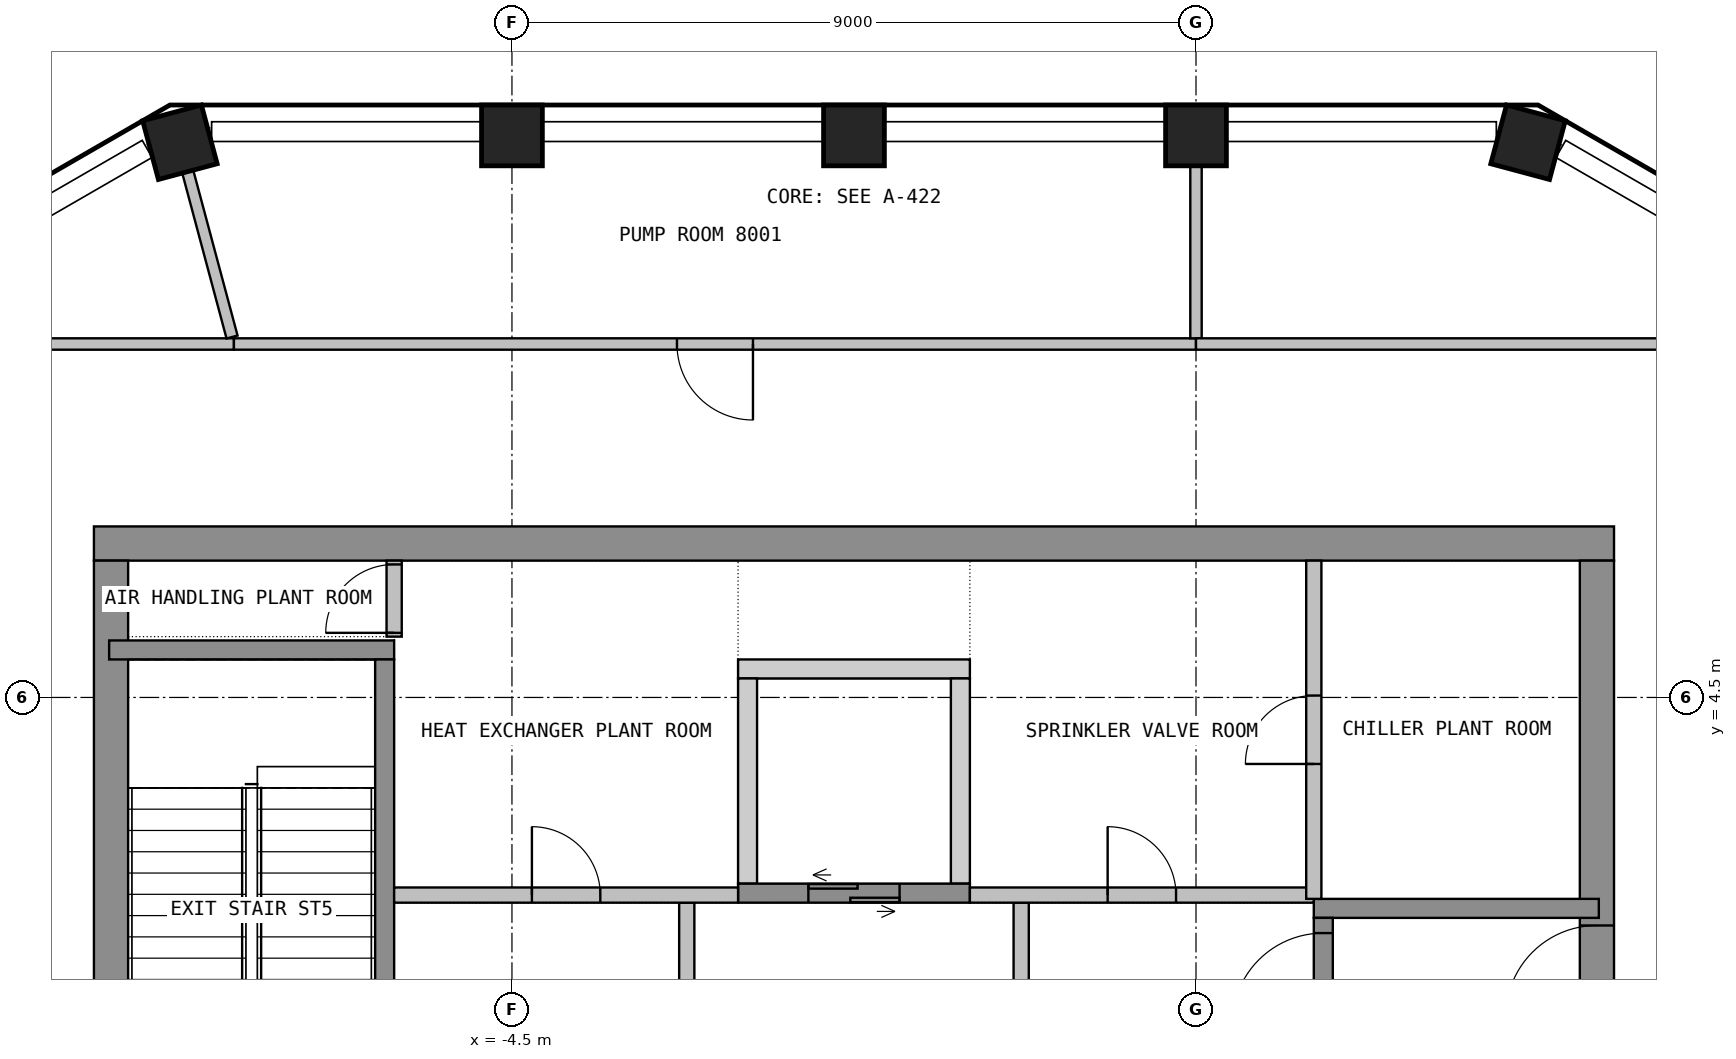
"""IFC4 building model, lengths in metres.
Left out: names, types, materials, properties, quantities, classifications, styles, units other than length and angle.
Written with IfcOpenShell. Run it as: python <this file> out.ifc"""

import sys

from ifc_helpers import new_model, si_unit, direction, frame, frame_2d, origin, origin_2d, place, context, subcontext, project, spatial, polyline, rectangle, outline, extrude, element, fill, save


model = new_model("IFC4")
c1 = context("Model", 3, precision=1e-05, world=origin(), true_north=direction((0.0, 1.0)))
c2 = subcontext(c1, "Body", "Model", "MODEL_VIEW")
j1 = project(units=[si_unit("LENGTHUNIT", "METRE"), si_unit("PLANEANGLEUNIT", "RADIAN")], contexts=[c1])
p1 = place(None, origin())
s1 = spatial("IfcSite", under=j1, at=p1, CompositionType="ELEMENT")
p2 = place(p1, origin())
s2 = spatial("IfcBuilding", under=s1, at=p2, CompositionType="ELEMENT")
p3 = place(p2, frame((0.0, 0.0, 327.9)))
s3 = spatial("IfcBuildingStorey", under=s2, at=p3, CompositionType="ELEMENT", Elevation=327.9)
for number, where, z_axis, x_axis in (
    (1, (8.869, 11.804, 0.0), (0.0, 0.0, 1.0), (-0.966, 0.259, 0.0)),
    (2, (4.5, 11.894, 0.0), (0.0, 0.0, 1.0), (-1.0, 0.0, 0.0)),
    (3, (0.0, 11.894, 0.0), (0.0, 0.0, 1.0), (-1.0, 0.0, 0.0)),
    (4, (-4.5, 11.894, 0.0), (0.0, 0.0, 1.0), (-1.0, 0.0, 0.0)),
    (5, (-8.869, 11.804, 0.0), (0.0, 0.0, 1.0), (-0.966, -0.259, 0.0)),
):
    element("IfcColumn", number, at=place(p3, frame(where, z_axis=z_axis, x_axis=x_axis)), inside=s3, PredefinedType="COLUMN", context=c2, shape_type="SweptSolid", body=[
        extrude(rectangle(XDim=0.8, YDim=0.8, at=origin_2d()), origin(), (0.0, 0.0, 1.0), 3.6),
    ])
p4 = place(p3, frame((-10.0, 6.525, 0.0), z_axis=(0.0, 0.0, 1.0), x_axis=(1.0, 0.0, 0.0)))
e6 = element("IfcWall", 6, at=p4, inside=s3, PredefinedType="SHEAR", context=c2, shape_type="SweptSolid", body=[
    extrude(rectangle(XDim=20.0, YDim=0.45, at=frame_2d((10.0, 0.0))), origin(), (0.0, 0.0, 1.0), 3.6),
])
p5 = place(p3, frame((-9.775, -6.3, 0.0), z_axis=(0.0, 0.0, 1.0), x_axis=(0.0, 1.0, 0.0)))
e7 = element("IfcWall", 7, at=p5, inside=s3, PredefinedType="SHEAR", context=c2, shape_type="SweptSolid", body=[
    extrude(rectangle(XDim=12.6, YDim=0.45, at=frame_2d((6.3, 0.0))), origin(), (0.0, 0.0, 1.0), 3.6),
])
p6 = place(p5, frame((4.8, 0.0, 0.0)))
e8 = element("IfcOpeningElement", 8, at=p6, cuts=e7, PredefinedType="OPENING", context=c2, shape_type="SweptSolid", body=[
    extrude(rectangle(XDim=1.2, YDim=2.1, at=frame_2d((0.6, 1.05))), frame((0.0, 0.235, 0.0), z_axis=(0.0, -1.0, 0.0), x_axis=(1.0, 0.0, 0.0)), (0.0, 0.0, 1.0), 0.47),
])
p7 = place(p3, frame((9.775, -6.3, 0.0), z_axis=(0.0, 0.0, 1.0), x_axis=(0.0, 1.0, 0.0)))
e9 = element("IfcWall", 9, at=p7, inside=s3, PredefinedType="SHEAR", context=c2, shape_type="SweptSolid", body=[
    extrude(rectangle(XDim=12.6, YDim=0.45, at=frame_2d((6.3, 0.0))), origin(), (0.0, 0.0, 1.0), 3.6),
])
p8 = place(p7, frame((6.6, 0.0, 0.0)))
e10 = element("IfcOpeningElement", 10, at=p8, cuts=e9, PredefinedType="OPENING", context=c2, shape_type="SweptSolid", body=[
    extrude(rectangle(XDim=1.2, YDim=2.1, at=frame_2d((0.6, 1.05))), frame((0.0, 0.235, 0.0), z_axis=(0.0, -1.0, 0.0), x_axis=(1.0, 0.0, 0.0)), (0.0, 0.0, 1.0), 0.47),
])
p9 = place(p3, origin())
e11 = element("IfcWall", 11, at=p9, inside=s3, PredefinedType="SHEAR", context=c2, shape_type="SweptSolid", body=[
    extrude(outline(polyline([(-1.525, 4.75), (1.525, 4.75), (1.525, 5.0), (-1.525, 5.0), (-1.525, 4.75)])), origin(), (0.0, 0.0, 1.0), 3.6),
])
p10 = place(p3, origin())
e12 = element("IfcWall", 12, at=p10, inside=s3, PredefinedType="SHEAR", context=c2, shape_type="SweptSolid", body=[
    extrude(outline(polyline([(-1.525, 2.05), (-1.275, 2.05), (-1.275, 4.75), (-1.525, 4.75), (-1.525, 2.05)])), origin(), (0.0, 0.0, 1.0), 3.6),
])
p11 = place(p3, origin())
e13 = element("IfcWall", 13, at=p11, inside=s3, PredefinedType="SHEAR", context=c2, shape_type="SweptSolid", body=[
    extrude(outline(polyline([(1.275, 2.05), (1.525, 2.05), (1.525, 4.75), (1.275, 4.75), (1.275, 2.05)])), origin(), (0.0, 0.0, 1.0), 3.6),
])
p12 = place(p3, frame((-1.525, 1.925, 0.0), z_axis=(0.0, 0.0, 1.0), x_axis=(1.0, 0.0, 0.0)))
e14 = element("IfcWall", 14, at=p12, inside=s3, PredefinedType="SHEAR", context=c2, shape_type="SweptSolid", body=[
    extrude(rectangle(XDim=3.05, YDim=0.25, at=frame_2d((1.525, 0.0))), origin(), (0.0, 0.0, 1.0), 3.6),
])
p13 = place(p12, frame((0.925, 0.0, 0.0)))
e15 = element("IfcOpeningElement", 15, at=p13, cuts=e14, PredefinedType="OPENING", context=c2, shape_type="SweptSolid", body=[
    extrude(rectangle(XDim=1.2, YDim=2.1, at=frame_2d((0.6, 1.05))), frame((0.0, 0.135, 0.0), z_axis=(0.0, -1.0, 0.0), x_axis=(1.0, 0.0, 0.0)), (0.0, 0.0, 1.0), 0.27),
])
p14 = place(p3, frame((-2.2, -1.8, 0.0), z_axis=(0.0, 0.0, 1.0), x_axis=(0.0, 1.0, 0.0)))
e16 = element("IfcWall", 16, at=p14, inside=s3, PredefinedType="PARTITIONING", context=c2, shape_type="SweptSolid", body=[
    extrude(rectangle(XDim=3.6, YDim=0.2, at=frame_2d((1.8, 0.0))), origin(), (0.0, 0.0, 1.0), 3.6),
])
p15 = place(p14, frame((1.2, 0.0, 0.0)))
e17 = element("IfcOpeningElement", 17, at=p15, cuts=e16, PredefinedType="OPENING", context=c2, shape_type="SweptSolid", body=[
    extrude(rectangle(XDim=1.2, YDim=2.1, at=frame_2d((0.6, 1.05))), frame((0.0, 0.11, 0.0), z_axis=(0.0, -1.0, 0.0), x_axis=(1.0, 0.0, 0.0)), (0.0, 0.0, 1.0), 0.22),
])
p16 = place(p3, frame((2.2, -1.8, 0.0), z_axis=(0.0, 0.0, 1.0), x_axis=(0.0, 1.0, 0.0)))
e18 = element("IfcWall", 18, at=p16, inside=s3, PredefinedType="PARTITIONING", context=c2, shape_type="SweptSolid", body=[
    extrude(rectangle(XDim=3.6, YDim=0.2, at=frame_2d((1.8, 0.0))), origin(), (0.0, 0.0, 1.0), 3.6),
])
p17 = place(p16, frame((1.2, 0.0, 0.0)))
e19 = element("IfcOpeningElement", 19, at=p17, cuts=e18, PredefinedType="OPENING", context=c2, shape_type="SweptSolid", body=[
    extrude(rectangle(XDim=1.2, YDim=2.1, at=frame_2d((0.6, 1.05))), frame((0.0, 0.11, 0.0), z_axis=(0.0, -1.0, 0.0), x_axis=(1.0, 0.0, 0.0)), (0.0, 0.0, 1.0), 0.22),
])
p18 = place(p3, frame((-9.8, 5.125, 0.0), z_axis=(0.0, 0.0, 1.0), x_axis=(1.0, 0.0, 0.0)))
e20 = element("IfcWall", 20, at=p18, inside=s3, PredefinedType="SHEAR", context=c2, shape_type="SweptSolid", body=[
    extrude(rectangle(XDim=3.75, YDim=0.25, at=frame_2d((1.875, 0.0))), origin(), (0.0, 0.0, 1.0), 3.6),
])
p19 = place(p3, frame((-6.175, -1.6, 0.0), z_axis=(0.0, 0.0, 1.0), x_axis=(0.0, 1.0, 0.0)))
e21 = element("IfcWall", 21, at=p19, inside=s3, PredefinedType="SHEAR", context=c2, shape_type="SweptSolid", body=[
    extrude(rectangle(XDim=6.6, YDim=0.25, at=frame_2d((3.3, 0.0))), origin(), (0.0, 0.0, 1.0), 3.6),
])
p20 = place(p19, frame((0.2, 0.0, 0.0)))
e22 = element("IfcOpeningElement", 22, at=p20, cuts=e21, PredefinedType="OPENING", context=c2, shape_type="SweptSolid", body=[
    extrude(rectangle(XDim=1.2, YDim=2.1, at=frame_2d((0.6, 1.05))), frame((0.0, 0.135, 0.0), z_axis=(0.0, -1.0, 0.0), x_axis=(1.0, 0.0, 0.0)), (0.0, 0.0, 1.0), 0.27),
])
p21 = place(p3, frame((6.05, 1.725, 0.0), z_axis=(0.0, 0.0, 1.0), x_axis=(1.0, 0.0, 0.0)))
e23 = element("IfcWall", 23, at=p21, inside=s3, PredefinedType="SHEAR", context=c2, shape_type="SweptSolid", body=[
    extrude(rectangle(XDim=3.75, YDim=0.25, at=frame_2d((1.875, 0.0))), origin(), (0.0, 0.0, 1.0), 3.6),
])
p22 = place(p3, frame((6.175, -5.0, 0.0), z_axis=(0.0, 0.0, 1.0), x_axis=(0.0, 1.0, 0.0)))
e24 = element("IfcWall", 24, at=p22, inside=s3, PredefinedType="SHEAR", context=c2, shape_type="SweptSolid", body=[
    extrude(rectangle(XDim=6.6, YDim=0.25, at=frame_2d((3.3, 0.0))), origin(), (0.0, 0.0, 1.0), 3.6),
])
p23 = place(p22, frame((5.2, 0.0, 0.0)))
e25 = element("IfcOpeningElement", 25, at=p23, cuts=e24, PredefinedType="OPENING", context=c2, shape_type="SweptSolid", body=[
    extrude(rectangle(XDim=1.2, YDim=2.1, at=frame_2d((0.6, 1.05))), frame((0.0, 0.135, 0.0), z_axis=(0.0, -1.0, 0.0), x_axis=(1.0, 0.0, 0.0)), (0.0, 0.0, 1.0), 0.27),
])
p24 = place(p3, frame((-6.05, 1.9, 0.0), z_axis=(0.0, 0.0, 1.0), x_axis=(1.0, 0.0, 0.0)))
e26 = element("IfcWall", 26, at=p24, inside=s3, PredefinedType="PARTITIONING", context=c2, shape_type="SweptSolid", body=[
    extrude(rectangle(XDim=4.525, YDim=0.2, at=frame_2d((2.263, 0.0))), origin(), (0.0, 0.0, 1.0), 3.6),
])
p25 = place(p24, frame((1.812, 0.0, 0.0)))
e27 = element("IfcOpeningElement", 27, at=p25, cuts=e26, PredefinedType="OPENING", context=c2, shape_type="SweptSolid", body=[
    extrude(rectangle(XDim=0.9, YDim=2.1, at=frame_2d((0.45, 1.05))), frame((0.0, 0.11, 0.0), z_axis=(0.0, -1.0, 0.0), x_axis=(1.0, 0.0, 0.0)), (0.0, 0.0, 1.0), 0.22),
])
p26 = place(p3, frame((1.525, 1.9, 0.0), z_axis=(0.0, 0.0, 1.0), x_axis=(1.0, 0.0, 0.0)))
e28 = element("IfcWall", 28, at=p26, inside=s3, PredefinedType="PARTITIONING", context=c2, shape_type="SweptSolid", body=[
    extrude(rectangle(XDim=4.525, YDim=0.2, at=frame_2d((2.263, 0.0))), origin(), (0.0, 0.0, 1.0), 3.6),
])
p27 = place(p26, frame((1.812, 0.0, 0.0)))
e29 = element("IfcOpeningElement", 29, at=p27, cuts=e28, PredefinedType="OPENING", context=c2, shape_type="SweptSolid", body=[
    extrude(rectangle(XDim=0.9, YDim=2.1, at=frame_2d((0.45, 1.05))), frame((0.0, 0.11, 0.0), z_axis=(0.0, -1.0, 0.0), x_axis=(1.0, 0.0, 0.0)), (0.0, 0.0, 1.0), 0.22),
])
p28 = place(p3, frame((-6.05, 5.3, 0.0), z_axis=(0.0, 0.0, 1.0), x_axis=(0.0, 1.0, 0.0)))
e30 = element("IfcWall", 30, at=p28, inside=s3, PredefinedType="PARTITIONING", context=c2, shape_type="SweptSolid", body=[
    extrude(rectangle(XDim=1.0, YDim=0.2, at=frame_2d((0.5, 0.0))), origin(), (0.0, 0.0, 1.0), 3.6),
])
p29 = place(p28, frame((0.05, 0.0, 0.0)))
e31 = element("IfcOpeningElement", 31, at=p29, cuts=e30, PredefinedType="OPENING", context=c2, shape_type="SweptSolid", body=[
    extrude(rectangle(XDim=0.9, YDim=2.1, at=frame_2d((0.45, 1.05))), frame((0.0, 0.11, 0.0), z_axis=(0.0, -1.0, 0.0), x_axis=(1.0, 0.0, 0.0)), (0.0, 0.0, 1.0), 0.22),
])
p30 = place(p3, frame((6.05, 1.85, 0.0), z_axis=(0.0, 0.0, 1.0), x_axis=(0.0, 1.0, 0.0)))
e32 = element("IfcWall", 32, at=p30, inside=s3, PredefinedType="PARTITIONING", context=c2, shape_type="SweptSolid", body=[
    extrude(rectangle(XDim=4.45, YDim=0.2, at=frame_2d((2.225, 0.0))), origin(), (0.0, 0.0, 1.0), 3.6),
])
p31 = place(p30, frame((1.775, 0.0, 0.0)))
e33 = element("IfcOpeningElement", 33, at=p31, cuts=e32, PredefinedType="OPENING", context=c2, shape_type="SweptSolid", body=[
    extrude(rectangle(XDim=0.9, YDim=2.1, at=frame_2d((0.45, 1.05))), frame((0.0, 0.11, 0.0), z_axis=(0.0, -1.0, 0.0), x_axis=(1.0, 0.0, 0.0)), (0.0, 0.0, 1.0), 0.22),
])
p32 = place(p3, frame((-8.158, 9.15, 0.0), z_axis=(0.0, 0.0, 1.0), x_axis=(-1.0, 0.0, 0.0)))
e34 = element("IfcWall", 34, at=p32, inside=s3, PredefinedType="PARTITIONING", context=c2, shape_type="SweptSolid", body=[
    extrude(rectangle(XDim=4.167, YDim=0.15, at=frame_2d((2.083, 0.0))), origin(), (0.0, 0.0, 1.0), 3.6),
])
p33 = place(p3, frame((-8.92, 11.994, 0.0), z_axis=(0.0, 0.0, 1.0), x_axis=(0.258771776933, -0.965938490517, 0.0)))
e35 = element("IfcWall", 35, at=p33, inside=s3, PredefinedType="PARTITIONING", context=c2, shape_type="SweptSolid", body=[
    extrude(rectangle(XDim=2.849, YDim=0.15, at=frame_2d((1.425, 0.0))), origin(), (0.0, 0.0, 1.0), 3.6),
])
p34 = place(p3, frame((4.5, 9.15, 0.0), z_axis=(0.0, 0.0, 1.0), x_axis=(-1.0, 0.0, 0.0)))
e36 = element("IfcWall", 36, at=p34, inside=s3, PredefinedType="PARTITIONING", context=c2, shape_type="SweptSolid", body=[
    extrude(rectangle(XDim=12.658, YDim=0.15, at=frame_2d((6.329, 0.0))), origin(), (0.0, 0.0, 1.0), 3.6),
])
p35 = place(p34, frame((5.829, 0.0, 0.0)))
e37 = element("IfcOpeningElement", 37, at=p35, cuts=e36, PredefinedType="OPENING", context=c2, shape_type="SweptSolid", body=[
    extrude(rectangle(XDim=1.0, YDim=2.1, at=frame_2d((0.5, 1.05))), frame((0.0, 0.085, 0.0), z_axis=(0.0, -1.0, 0.0), x_axis=(1.0, 0.0, 0.0)), (0.0, 0.0, 1.0), 0.17),
])
p36 = place(p3, frame((4.5, 11.994, 0.0), z_axis=(0.0, 0.0, 1.0), x_axis=(0.0, -1.0, 0.0)))
e38 = element("IfcWall", 38, at=p36, inside=s3, PredefinedType="PARTITIONING", context=c2, shape_type="SweptSolid", body=[
    extrude(rectangle(XDim=2.769, YDim=0.15, at=frame_2d((1.384, 0.0))), origin(), (0.0, 0.0, 1.0), 3.6),
])
p37 = place(p3, frame((12.475, 9.15, 0.0), z_axis=(0.0, 0.0, 1.0), x_axis=(-1.0, 0.0, 0.0)))
e39 = element("IfcWall", 39, at=p37, inside=s3, PredefinedType="PARTITIONING", context=c2, shape_type="SweptSolid", body=[
    extrude(rectangle(XDim=7.975, YDim=0.15, at=frame_2d((3.988, 0.0))), origin(), (0.0, 0.0, 1.0), 3.6),
])
p38 = place(p8, origin())
e40 = element("IfcDoor", 40, at=p38, inside=s3, OperationType="SINGLE_SWING_RIGHT", PredefinedType="DOOR", context=c2, shape_type="SweptSolid", body=[
    extrude(rectangle(XDim=1.2, YDim=2.1, at=frame_2d((0.6, 1.05))), frame((0.0, 0.025, 0.0), z_axis=(0.0, -1.0, 0.0), x_axis=(1.0, 0.0, 0.0)), (0.0, 0.0, 1.0), 0.05),
])
fill(e10, e40)
p39 = place(p13, origin())
e41 = element("IfcDoor", 41, at=p39, inside=s3, OperationType="DOUBLE_DOOR_SLIDING", PredefinedType="DOOR", context=c2, shape_type="SweptSolid", body=[
    extrude(rectangle(XDim=1.2, YDim=2.1, at=frame_2d((0.6, 1.05))), frame((0.0, 0.025, 0.0), z_axis=(0.0, -1.0, 0.0), x_axis=(1.0, 0.0, 0.0)), (0.0, 0.0, 1.0), 0.05),
])
fill(e15, e41)
p40 = place(p23, origin())
e42 = element("IfcDoor", 42, at=p40, inside=s3, OperationType="SINGLE_SWING_LEFT", PredefinedType="DOOR", context=c2, shape_type="SweptSolid", body=[
    extrude(rectangle(XDim=1.2, YDim=2.1, at=frame_2d((0.6, 1.05))), frame((0.0, 0.025, 0.0), z_axis=(0.0, -1.0, 0.0), x_axis=(1.0, 0.0, 0.0)), (0.0, 0.0, 1.0), 0.05),
])
fill(e25, e42)
p41 = place(p25, origin())
e43 = element("IfcDoor", 43, at=p41, inside=s3, OperationType="SINGLE_SWING_LEFT", PredefinedType="DOOR", context=c2, shape_type="SweptSolid", body=[
    extrude(rectangle(XDim=0.9, YDim=2.1, at=frame_2d((0.45, 1.05))), frame((0.0, 0.025, 0.0), z_axis=(0.0, -1.0, 0.0), x_axis=(1.0, 0.0, 0.0)), (0.0, 0.0, 1.0), 0.05),
])
fill(e27, e43)
p42 = place(p27, origin())
e44 = element("IfcDoor", 44, at=p42, inside=s3, OperationType="SINGLE_SWING_LEFT", PredefinedType="DOOR", context=c2, shape_type="SweptSolid", body=[
    extrude(rectangle(XDim=0.9, YDim=2.1, at=frame_2d((0.45, 1.05))), frame((0.0, 0.025, 0.0), z_axis=(0.0, -1.0, 0.0), x_axis=(1.0, 0.0, 0.0)), (0.0, 0.0, 1.0), 0.05),
])
fill(e29, e44)
p43 = place(p29, origin())
e45 = element("IfcDoor", 45, at=p43, inside=s3, OperationType="SINGLE_SWING_LEFT", PredefinedType="DOOR", context=c2, shape_type="SweptSolid", body=[
    extrude(rectangle(XDim=0.9, YDim=2.1, at=frame_2d((0.45, 1.05))), frame((0.0, 0.025, 0.0), z_axis=(0.0, -1.0, 0.0), x_axis=(1.0, 0.0, 0.0)), (0.0, 0.0, 1.0), 0.05),
])
fill(e31, e45)
p44 = place(p31, origin())
e46 = element("IfcDoor", 46, at=p44, inside=s3, OperationType="SINGLE_SWING_LEFT", PredefinedType="DOOR", context=c2, shape_type="SweptSolid", body=[
    extrude(rectangle(XDim=0.9, YDim=2.1, at=frame_2d((0.45, 1.05))), frame((0.0, 0.025, 0.0), z_axis=(0.0, -1.0, 0.0), x_axis=(1.0, 0.0, 0.0)), (0.0, 0.0, 1.0), 0.05),
])
fill(e33, e46)
p45 = place(p35, origin())
e47 = element("IfcDoor", 47, at=p45, inside=s3, OperationType="SINGLE_SWING_LEFT", PredefinedType="DOOR", context=c2, shape_type="SweptSolid", body=[
    extrude(rectangle(XDim=1.0, YDim=2.1, at=frame_2d((0.5, 1.05))), frame((0.0, 0.025, 0.0), z_axis=(0.0, -1.0, 0.0), x_axis=(1.0, 0.0, 0.0)), (0.0, 0.0, 1.0), 0.05),
])
fill(e37, e47)
save(model, sys.argv[1])
